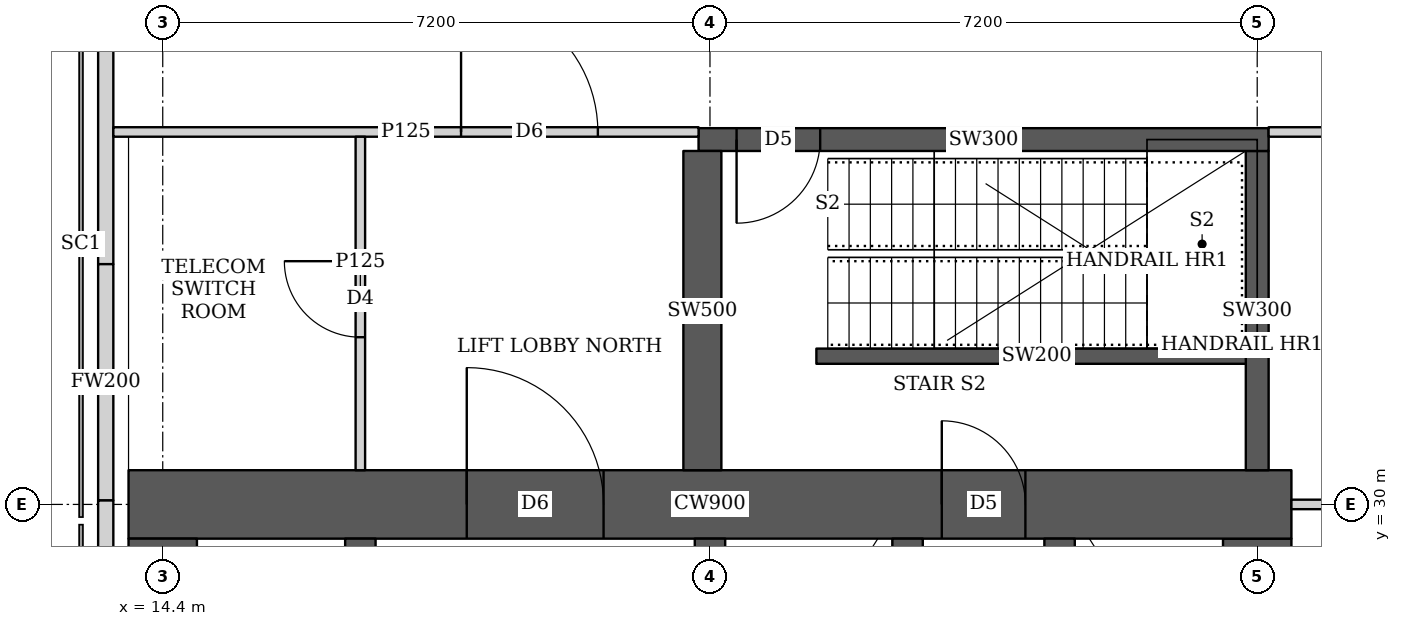
"""IFC4 building model, lengths in metres.
Left out: names, types, materials, properties, quantities, classifications, styles, units other than length and angle.
Written with IfcOpenShell. Run it as: python <this file> out.ifc"""

import sys

from ifc_helpers import new_model, si_unit, direction, frame, frame_2d, origin, place, context, subcontext, project, spatial, rectangle, extrude, element, fill, save


model = new_model("IFC4")
c1 = context("Model", 3, precision=1e-05, world=origin(), true_north=direction((0.0, 1.0)))
c2 = subcontext(c1, "Body", "Model", "MODEL_VIEW")
j1 = project(units=[si_unit("LENGTHUNIT", "METRE"), si_unit("PLANEANGLEUNIT", "RADIAN")], contexts=[c1])
p1 = place(None, origin())
s1 = spatial("IfcSite", under=j1, at=p1, CompositionType="ELEMENT")
p2 = place(p1, origin())
s2 = spatial("IfcBuilding", under=s1, at=p2, CompositionType="ELEMENT")
p3 = place(p2, frame((0.0, 0.0, 246.2)))
s3 = spatial("IfcBuildingStorey", under=s2, at=p3, CompositionType="ELEMENT", Elevation=246.2)
p4 = place(p3, frame((13.95, 30.0, 0.0), z_axis=(0.0, 0.0, 1.0), x_axis=(1.0, 0.0, 0.0)))
e1 = element("IfcWall", 1, at=p4, inside=s3, PredefinedType="SHEAR", context=c2, shape_type="SweptSolid", body=[
    extrude(rectangle(XDim=15.3, YDim=0.9, at=frame_2d((7.65, 0.0))), origin(), (0.0, 0.0, 1.0), 5.4),
])
p5 = place(p4, frame((4.45, 0.0, 0.0)))
e2 = element("IfcOpeningElement", 2, at=p5, cuts=e1, PredefinedType="OPENING", context=c2, shape_type="SweptSolid", body=[
    extrude(rectangle(XDim=1.8, YDim=2.1, at=frame_2d((0.9, 1.05))), frame((0.0, 0.46, 0.0), z_axis=(0.0, -1.0, 0.0), x_axis=(1.0, 0.0, 0.0)), (0.0, 0.0, 1.0), 0.92),
])
p6 = place(p4, frame((10.7, 0.0, 0.0)))
e3 = element("IfcOpeningElement", 3, at=p6, cuts=e1, PredefinedType="OPENING", context=c2, shape_type="SweptSolid", body=[
    extrude(rectangle(XDim=1.1, YDim=2.1, at=frame_2d((0.55, 1.05))), frame((0.0, 0.46, 0.0), z_axis=(0.0, -1.0, 0.0), x_axis=(1.0, 0.0, 0.0)), (0.0, 0.0, 1.0), 0.92),
])
for number, where, z_axis, x_axis in (
    (4, (14.4, 15.45, 0.0), (0.0, 0.0, 1.0), (0.0, 1.0, 0.0)),
    (5, (28.8, 15.45, 0.0), (0.0, 0.0, 1.0), (0.0, 1.0, 0.0)),
):
    element("IfcWall", number, at=place(p3, frame(where, z_axis=z_axis, x_axis=x_axis)), inside=s3, PredefinedType="SHEAR", context=c2, shape_type="SweptSolid", body=[
        extrude(rectangle(XDim=14.1, YDim=0.9, at=frame_2d((7.05, 0.0))), origin(), (0.0, 0.0, 1.0), 5.4),
    ])
p7 = place(p3, frame((17.0, 15.45, 0.0), z_axis=(0.0, 0.0, 1.0), x_axis=(0.0, 1.0, 0.0)))
e6 = element("IfcWall", 6, at=p7, inside=s3, PredefinedType="SHEAR", context=c2, shape_type="SweptSolid", body=[
    extrude(rectangle(XDim=14.1, YDim=0.4, at=frame_2d((7.05, 0.0))), origin(), (0.0, 0.0, 1.0), 5.4),
])
p8 = place(p7, frame((0.925, 0.0, 0.0)))
e7 = element("IfcOpeningElement", 7, at=p8, cuts=e6, PredefinedType="OPENING", context=c2, shape_type="SweptSolid", body=[
    extrude(rectangle(XDim=1.0, YDim=2.1, at=frame_2d((0.5, 1.05))), frame((0.0, 0.21, 0.0), z_axis=(0.0, -1.0, 0.0), x_axis=(1.0, 0.0, 0.0)), (0.0, 0.0, 1.0), 0.42),
])
p9 = place(p7, frame((4.675, 0.0, 0.0)))
e8 = element("IfcOpeningElement", 8, at=p9, cuts=e6, PredefinedType="OPENING", context=c2, shape_type="SweptSolid", body=[
    extrude(rectangle(XDim=1.0, YDim=2.1, at=frame_2d((0.5, 1.05))), frame((0.0, 0.21, 0.0), z_axis=(0.0, -1.0, 0.0), x_axis=(1.0, 0.0, 0.0)), (0.0, 0.0, 1.0), 0.42),
])
p10 = place(p7, frame((8.425, 0.0, 0.0)))
e9 = element("IfcOpeningElement", 9, at=p10, cuts=e6, PredefinedType="OPENING", context=c2, shape_type="SweptSolid", body=[
    extrude(rectangle(XDim=1.0, YDim=2.1, at=frame_2d((0.5, 1.05))), frame((0.0, 0.21, 0.0), z_axis=(0.0, -1.0, 0.0), x_axis=(1.0, 0.0, 0.0)), (0.0, 0.0, 1.0), 0.42),
])
p11 = place(p7, frame((12.175, 0.0, 0.0)))
e10 = element("IfcOpeningElement", 10, at=p11, cuts=e6, PredefinedType="OPENING", context=c2, shape_type="SweptSolid", body=[
    extrude(rectangle(XDim=1.0, YDim=2.1, at=frame_2d((0.5, 1.05))), frame((0.0, 0.21, 0.0), z_axis=(0.0, -1.0, 0.0), x_axis=(1.0, 0.0, 0.0)), (0.0, 0.0, 1.0), 0.42),
])
p12 = place(p3, frame((21.6, 15.45, 0.0), z_axis=(0.0, 0.0, 1.0), x_axis=(0.0, 1.0, 0.0)))
e11 = element("IfcWall", 11, at=p12, inside=s3, PredefinedType="SHEAR", context=c2, shape_type="SweptSolid", body=[
    extrude(rectangle(XDim=14.1, YDim=0.4, at=frame_2d((7.05, 0.0))), origin(), (0.0, 0.0, 1.0), 5.4),
])
p13 = place(p12, frame((0.875, 0.0, 0.0)))
e12 = element("IfcOpeningElement", 12, at=p13, cuts=e11, PredefinedType="OPENING", context=c2, shape_type="SweptSolid", body=[
    extrude(rectangle(XDim=1.1, YDim=2.1, at=frame_2d((0.55, 1.05))), frame((0.0, 0.21, 0.0), z_axis=(0.0, -1.0, 0.0), x_axis=(1.0, 0.0, 0.0)), (0.0, 0.0, 1.0), 0.42),
])
p14 = place(p12, frame((4.625, 0.0, 0.0)))
e13 = element("IfcOpeningElement", 13, at=p14, cuts=e11, PredefinedType="OPENING", context=c2, shape_type="SweptSolid", body=[
    extrude(rectangle(XDim=1.1, YDim=2.1, at=frame_2d((0.55, 1.05))), frame((0.0, 0.21, 0.0), z_axis=(0.0, -1.0, 0.0), x_axis=(1.0, 0.0, 0.0)), (0.0, 0.0, 1.0), 0.42),
])
p15 = place(p12, frame((8.375, 0.0, 0.0)))
e14 = element("IfcOpeningElement", 14, at=p15, cuts=e11, PredefinedType="OPENING", context=c2, shape_type="SweptSolid", body=[
    extrude(rectangle(XDim=1.1, YDim=2.1, at=frame_2d((0.55, 1.05))), frame((0.0, 0.21, 0.0), z_axis=(0.0, -1.0, 0.0), x_axis=(1.0, 0.0, 0.0)), (0.0, 0.0, 1.0), 0.42),
])
p16 = place(p12, frame((12.125, 0.0, 0.0)))
e15 = element("IfcOpeningElement", 15, at=p16, cuts=e11, PredefinedType="OPENING", context=c2, shape_type="SweptSolid", body=[
    extrude(rectangle(XDim=1.1, YDim=2.1, at=frame_2d((0.55, 1.05))), frame((0.0, 0.21, 0.0), z_axis=(0.0, -1.0, 0.0), x_axis=(1.0, 0.0, 0.0)), (0.0, 0.0, 1.0), 0.42),
])
p17 = place(p3, frame((24.2, 15.45, 0.0), z_axis=(0.0, 0.0, 1.0), x_axis=(0.0, 1.0, 0.0)))
e16 = element("IfcWall", 16, at=p17, inside=s3, PredefinedType="SHEAR", context=c2, shape_type="SweptSolid", body=[
    extrude(rectangle(XDim=14.1, YDim=0.4, at=frame_2d((7.05, 0.0))), origin(), (0.0, 0.0, 1.0), 5.4),
])
p18 = place(p3, frame((26.2, 26.45, 0.0), z_axis=(0.0, 0.0, 1.0), x_axis=(0.0, 1.0, 0.0)))
e17 = element("IfcWall", 17, at=p18, inside=s3, PredefinedType="SHEAR", context=c2, shape_type="SweptSolid", body=[
    extrude(rectangle(XDim=3.1, YDim=0.4, at=frame_2d((1.55, 0.0))), origin(), (0.0, 0.0, 1.0), 5.4),
])
p19 = place(p18, frame((1.075, 0.0, 0.0)))
e18 = element("IfcOpeningElement", 18, at=p19, cuts=e17, PredefinedType="OPENING", context=c2, shape_type="SweptSolid", body=[
    extrude(rectangle(XDim=1.2, YDim=2.1, at=frame_2d((0.6, 1.05))), frame((0.0, 0.21, 0.0), z_axis=(0.0, -1.0, 0.0), x_axis=(1.0, 0.0, 0.0)), (0.0, 0.0, 1.0), 0.42),
])
p20 = place(p3, frame((21.45, 34.8, 0.0), z_axis=(0.0, 0.0, 1.0), x_axis=(1.0, 0.0, 0.0)))
e19 = element("IfcWall", 19, at=p20, inside=s3, PredefinedType="SHEAR", context=c2, shape_type="SweptSolid", body=[
    extrude(rectangle(XDim=7.5, YDim=0.3, at=frame_2d((3.75, 0.0))), origin(), (0.0, 0.0, 1.0), 5.4),
])
p21 = place(p20, frame((0.5, 0.0, 0.0)))
e20 = element("IfcOpeningElement", 20, at=p21, cuts=e19, PredefinedType="OPENING", context=c2, shape_type="SweptSolid", body=[
    extrude(rectangle(XDim=1.1, YDim=2.1, at=frame_2d((0.55, 1.05))), frame((0.0, 0.16, 0.0), z_axis=(0.0, -1.0, 0.0), x_axis=(1.0, 0.0, 0.0)), (0.0, 0.0, 1.0), 0.32),
])
p22 = place(p3, frame((21.5, 30.45, 0.0), z_axis=(0.0, 0.0, 1.0), x_axis=(0.0, 1.0, 0.0)))
e21 = element("IfcWall", 21, at=p22, inside=s3, PredefinedType="SHEAR", context=c2, shape_type="SweptSolid", body=[
    extrude(rectangle(XDim=4.2, YDim=0.5, at=frame_2d((2.1, 0.0))), origin(), (0.0, 0.0, 1.0), 5.4),
])
p23 = place(p3, frame((28.8, 30.45, 0.0), z_axis=(0.0, 0.0, 1.0), x_axis=(0.0, 1.0, 0.0)))
e22 = element("IfcWall", 22, at=p23, inside=s3, PredefinedType="SHEAR", context=c2, shape_type="SweptSolid", body=[
    extrude(rectangle(XDim=4.2, YDim=0.3, at=frame_2d((2.1, 0.0))), origin(), (0.0, 0.0, 1.0), 5.4),
])
p24 = place(p3, frame((13.65, 44.837, 0.0), z_axis=(0.0, 0.0, 1.0), x_axis=(0.0, -1.0, 0.0)))
e23 = element("IfcWall", 23, at=p24, inside=s3, PredefinedType="SOLIDWALL", context=c2, shape_type="SweptSolid", body=[
    extrude(rectangle(XDim=11.676, YDim=0.2, at=frame_2d((5.838, 0.0))), origin(), (0.0, 0.0, 1.0), 5.15),
])
p25 = place(p3, frame((13.65, 33.161, 0.0), z_axis=(0.0, 0.0, 1.0), x_axis=(0.0, -1.0, 0.0)))
e24 = element("IfcWall", 24, at=p25, inside=s3, PredefinedType="SOLIDWALL", context=c2, shape_type="SweptSolid", body=[
    extrude(rectangle(XDim=3.109, YDim=0.2, at=frame_2d((1.554, 0.0))), origin(), (0.0, 0.0, 1.0), 3.55),
])
p26 = place(p3, frame((13.65, 30.052, 0.0), z_axis=(0.0, 0.0, 1.0), x_axis=(0.0, -1.0, 0.0)))
e25 = element("IfcWall", 25, at=p26, inside=s3, PredefinedType="SOLIDWALL", context=c2, shape_type="SweptSolid", body=[
    extrude(rectangle(XDim=15.114, YDim=0.2, at=frame_2d((7.557, 0.0))), origin(), (0.0, 0.0, 1.0), 5.15),
])
p27 = place(p26, frame((1.552, 0.0, 0.6)))
e26 = element("IfcOpeningElement", 26, at=p27, cuts=e25, PredefinedType="OPENING", context=c2, shape_type="SweptSolid", body=[
    extrude(rectangle(XDim=3.0, YDim=2.7, at=frame_2d((1.5, 1.35))), frame((0.0, 0.11, 0.0), z_axis=(0.0, -1.0, 0.0), x_axis=(1.0, 0.0, 0.0)), (0.0, 0.0, 1.0), 0.22),
])
p28 = place(p26, frame((6.052, 0.0, 0.6)))
e27 = element("IfcOpeningElement", 27, at=p28, cuts=e25, PredefinedType="OPENING", context=c2, shape_type="SweptSolid", body=[
    extrude(rectangle(XDim=3.0, YDim=2.7, at=frame_2d((1.5, 1.35))), frame((0.0, 0.11, 0.0), z_axis=(0.0, -1.0, 0.0), x_axis=(1.0, 0.0, 0.0)), (0.0, 0.0, 1.0), 0.22),
])
p29 = place(p26, frame((10.552, 0.0, 0.6)))
e28 = element("IfcOpeningElement", 28, at=p29, cuts=e25, PredefinedType="OPENING", context=c2, shape_type="SweptSolid", body=[
    extrude(rectangle(XDim=3.0, YDim=2.7, at=frame_2d((1.5, 1.35))), frame((0.0, 0.11, 0.0), z_axis=(0.0, -1.0, 0.0), x_axis=(1.0, 0.0, 0.0)), (0.0, 0.0, 1.0), 0.22),
])
p30 = place(p3, frame((13.75, 34.9, 0.0), z_axis=(0.0, 0.0, 1.0), x_axis=(1.0, 0.0, 0.0)))
e29 = element("IfcWall", 29, at=p30, inside=s3, PredefinedType="PARTITIONING", context=c2, shape_type="SweptSolid", body=[
    extrude(rectangle(XDim=7.7, YDim=0.125, at=frame_2d((3.85, 0.0))), origin(), (0.0, 0.0, 1.0), 2.75),
])
p31 = place(p30, frame((4.575, 0.0, 0.0)))
e30 = element("IfcOpeningElement", 30, at=p31, cuts=e29, PredefinedType="OPENING", context=c2, shape_type="SweptSolid", body=[
    extrude(rectangle(XDim=1.8, YDim=2.1, at=frame_2d((0.9, 1.05))), frame((0.0, 0.073, 0.0), z_axis=(0.0, -1.0, 0.0), x_axis=(1.0, 0.0, 0.0)), (0.0, 0.0, 1.0), 0.145),
])
p32 = place(p3, frame((17.0, 30.45, 0.0), z_axis=(0.0, 0.0, 1.0), x_axis=(0.0, 1.0, 0.0)))
e31 = element("IfcWall", 31, at=p32, inside=s3, PredefinedType="PARTITIONING", context=c2, shape_type="SweptSolid", body=[
    extrude(rectangle(XDim=4.387, YDim=0.125, at=frame_2d((2.193, 0.0))), origin(), (0.0, 0.0, 1.0), 5.15),
])
p33 = place(p32, frame((1.75, 0.0, 0.0)))
e32 = element("IfcOpeningElement", 32, at=p33, cuts=e31, PredefinedType="OPENING", context=c2, shape_type="SweptSolid", body=[
    extrude(rectangle(XDim=1.0, YDim=2.1, at=frame_2d((0.5, 1.05))), frame((0.0, 0.073, 0.0), z_axis=(0.0, -1.0, 0.0), x_axis=(1.0, 0.0, 0.0)), (0.0, 0.0, 1.0), 0.145),
])
p34 = place(p3, frame((28.95, 34.9, 0.0), z_axis=(0.0, 0.0, 1.0), x_axis=(1.0, 0.0, 0.0)))
e33 = element("IfcWall", 33, at=p34, inside=s3, PredefinedType="PARTITIONING", context=c2, shape_type="SweptSolid", body=[
    extrude(rectangle(XDim=4.588, YDim=0.125, at=frame_2d((2.294, 0.0))), origin(), (0.0, 0.0, 1.0), 2.75),
])
p35 = place(p3, frame((29.25, 30.0, 0.0), z_axis=(0.0, 0.0, 1.0), x_axis=(1.0, 0.0, 0.0)))
e34 = element("IfcWall", 34, at=p35, inside=s3, PredefinedType="PARTITIONING", context=c2, shape_type="SweptSolid", body=[
    extrude(rectangle(XDim=3.049, YDim=0.125, at=frame_2d((1.524, 0.0))), origin(), (0.0, 0.0, 1.0), 3.55),
])
p36 = place(p3, frame((23.0, 31.95, 0.0), z_axis=(0.0, 0.0, 1.0), x_axis=(1.0, 0.0, 0.0)))
e35 = element("IfcWall", 35, at=p36, inside=s3, PredefinedType="SHEAR", context=c2, shape_type="SweptSolid", body=[
    extrude(rectangle(XDim=5.8, YDim=0.2, at=frame_2d((2.9, 0.0))), origin(), (0.0, 0.0, 1.0), 5.4),
])
p37 = place(p33, origin())
e36 = element("IfcDoor", 36, at=p37, inside=s3, OperationType="SINGLE_SWING_RIGHT", PredefinedType="DOOR", context=c2, shape_type="SweptSolid", body=[
    extrude(rectangle(XDim=1.0, YDim=2.1, at=frame_2d((0.5, 1.05))), frame((0.0, 0.025, 0.0), z_axis=(0.0, -1.0, 0.0), x_axis=(1.0, 0.0, 0.0)), (0.0, 0.0, 1.0), 0.05),
])
fill(e32, e36)
p38 = place(p31, origin())
e37 = element("IfcDoor", 37, at=p38, inside=s3, OperationType="DOUBLE_DOOR_SINGLE_SWING", PredefinedType="DOOR", context=c2, shape_type="SweptSolid", body=[
    extrude(rectangle(XDim=1.8, YDim=2.1, at=frame_2d((0.9, 1.05))), frame((0.0, 0.025, 0.0), z_axis=(0.0, -1.0, 0.0), x_axis=(1.0, 0.0, 0.0)), (0.0, 0.0, 1.0), 0.05),
])
fill(e30, e37)
p39 = place(p5, origin())
e38 = element("IfcDoor", 38, at=p39, inside=s3, OperationType="DOUBLE_DOOR_SINGLE_SWING", PredefinedType="DOOR", context=c2, shape_type="SweptSolid", body=[
    extrude(rectangle(XDim=1.8, YDim=2.1, at=frame_2d((0.9, 1.05))), frame((0.0, 0.025, 0.0), z_axis=(0.0, -1.0, 0.0), x_axis=(1.0, 0.0, 0.0)), (0.0, 0.0, 1.0), 0.05),
])
fill(e2, e38)
p40 = place(p6, origin())
e39 = element("IfcDoor", 39, at=p40, inside=s3, OperationType="SINGLE_SWING_LEFT", PredefinedType="DOOR", context=c2, shape_type="SweptSolid", body=[
    extrude(rectangle(XDim=1.1, YDim=2.1, at=frame_2d((0.55, 1.05))), frame((0.0, 0.025, 0.0), z_axis=(0.0, -1.0, 0.0), x_axis=(1.0, 0.0, 0.0)), (0.0, 0.0, 1.0), 0.05),
])
fill(e3, e39)
p41 = place(p21, origin())
e40 = element("IfcDoor", 40, at=p41, inside=s3, OperationType="SINGLE_SWING_RIGHT", PredefinedType="DOOR", context=c2, shape_type="SweptSolid", body=[
    extrude(rectangle(XDim=1.1, YDim=2.1, at=frame_2d((0.55, 1.05))), frame((0.0, 0.025, 0.0), z_axis=(0.0, -1.0, 0.0), x_axis=(1.0, 0.0, 0.0)), (0.0, 0.0, 1.0), 0.05),
])
fill(e20, e40)
save(model, sys.argv[1])
